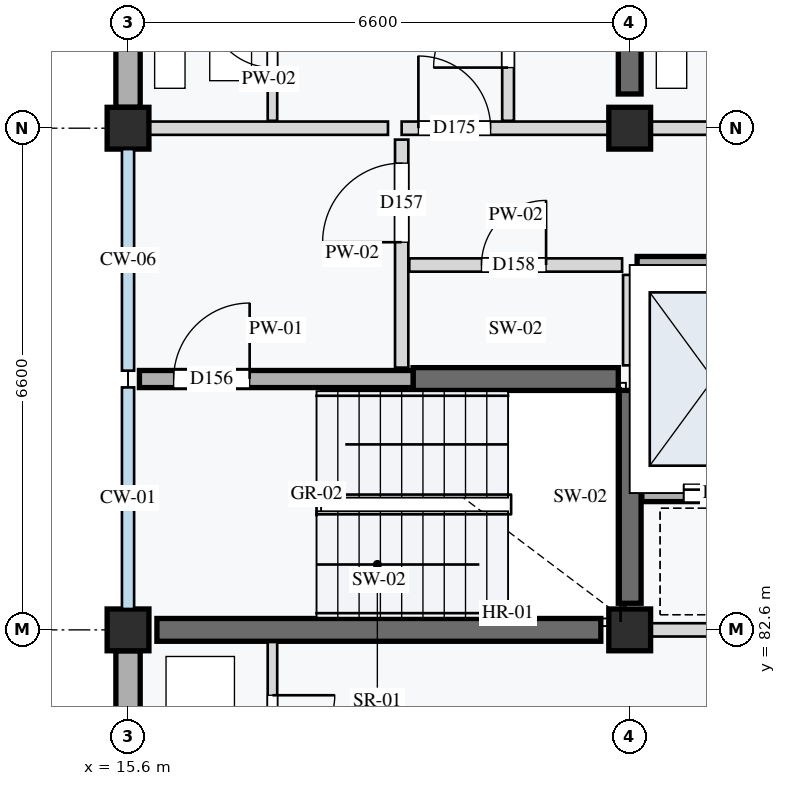
"""IFC4 building model, lengths in metres.
Left out: names, types, materials, properties, quantities, classifications, styles, units other than length and angle.
Written with IfcOpenShell. Run it as: python <this file> out.ifc"""

import sys

from ifc_helpers import new_model, si_unit, direction, frame, frame_2d, origin, origin_2d, place, context, subcontext, project, spatial, rectangle, extrude, element, fill, save


model = new_model("IFC4")
c1 = context("Model", 3, precision=1e-05, world=origin(), true_north=direction((0.0, 1.0)))
c2 = subcontext(c1, "Body", "Model", "MODEL_VIEW")
j1 = project(units=[si_unit("LENGTHUNIT", "METRE"), si_unit("PLANEANGLEUNIT", "RADIAN")], contexts=[c1])
p1 = place(None, origin())
s1 = spatial("IfcSite", under=j1, at=p1, CompositionType="ELEMENT")
p2 = place(p1, origin())
s2 = spatial("IfcBuilding", under=s1, at=p2, CompositionType="ELEMENT")
p3 = place(p2, frame((0.0, 0.0, 18.0)))
s3 = spatial("IfcBuildingStorey", under=s2, at=p3, CompositionType="ELEMENT", Elevation=18.0)
for number, where, z_axis, x_axis in (
    (1, (15.6, 82.6, 0.0), (0.0, 0.0, 1.0), (1.0, 0.0, 0.0)),
    (2, (15.6, 89.2, 0.0), (0.0, 0.0, 1.0), (1.0, 0.0, 0.0)),
    (3, (22.2, 82.6, 0.0), (0.0, 0.0, 1.0), (1.0, 0.0, 0.0)),
    (4, (22.2, 89.2, 0.0), (0.0, 0.0, 1.0), (1.0, 0.0, 0.0)),
):
    element("IfcColumn", number, at=place(p3, frame(where, z_axis=z_axis, x_axis=x_axis)), inside=s3, PredefinedType="COLUMN", context=c2, shape_type="SweptSolid", body=[
        extrude(rectangle(XDim=0.55, YDim=0.55, at=origin_2d()), origin(), (0.0, 0.0, 1.0), 3.2),
    ])
p4 = place(p3, frame((15.98, 82.6, 0.0), z_axis=(0.0, 0.0, 1.0), x_axis=(1.0, 0.0, 0.0)))
e5 = element("IfcWall", 5, at=p4, inside=s3, PredefinedType="SHEAR", context=c2, shape_type="SweptSolid", body=[
    extrude(rectangle(XDim=5.84, YDim=0.3, at=frame_2d((2.92, 0.0))), origin(), (0.0, 0.0, 1.0), 2.96),
])
p5 = place(p3, frame((19.35, 85.9, 0.0), z_axis=(0.0, 0.0, 1.0), x_axis=(1.0, 0.0, 0.0)))
e6 = element("IfcWall", 6, at=p5, inside=s3, PredefinedType="SHEAR", context=c2, shape_type="SweptSolid", body=[
    extrude(rectangle(XDim=2.7, YDim=0.3, at=frame_2d((1.35, 0.0))), origin(), (0.0, 0.0, 1.0), 2.96),
])
p6 = place(p3, frame((22.2, 82.95, 0.0), z_axis=(0.0, 0.0, 1.0), x_axis=(0.0, 1.0, 0.0)))
e7 = element("IfcWall", 7, at=p6, inside=s3, PredefinedType="SHEAR", context=c2, shape_type="SweptSolid", body=[
    extrude(rectangle(XDim=2.8, YDim=0.3, at=frame_2d((1.4, 0.0))), origin(), (0.0, 0.0, 1.0), 2.96),
])
p7 = place(p3, frame((22.2, 89.65, 0.0), z_axis=(0.0, 0.0, 1.0), x_axis=(0.0, 1.0, 0.0)))
e8 = element("IfcWall", 8, at=p7, inside=s3, PredefinedType="SHEAR", context=c2, shape_type="SweptSolid", body=[
    extrude(rectangle(XDim=5.7, YDim=0.3, at=frame_2d((2.85, 0.0))), origin(), (0.0, 0.0, 1.0), 2.96),
])
p8 = place(p3, frame((15.6, 76.275, 0.0), z_axis=(0.0, 0.0, 1.0), x_axis=(0.0, 1.0, 0.0)))
e9 = element("IfcWall", 9, at=p8, inside=s3, PredefinedType="STANDARD", context=c2, shape_type="SweptSolid", body=[
    extrude(rectangle(XDim=6.05, YDim=0.32, at=frame_2d((3.025, 0.0))), origin(), (0.0, 0.0, 1.0), 2.65),
])
p9 = place(p3, frame((15.6, 89.475, 0.0), z_axis=(0.0, 0.0, 1.0), x_axis=(0.0, 1.0, 0.0)))
e10 = element("IfcWall", 10, at=p9, inside=s3, PredefinedType="STANDARD", context=c2, shape_type="SweptSolid", body=[
    extrude(rectangle(XDim=6.05, YDim=0.32, at=frame_2d((3.025, 0.0))), origin(), (0.0, 0.0, 1.0), 2.65),
])
p10 = place(p3, frame((15.75, 85.9, 0.0), z_axis=(0.0, 0.0, 1.0), x_axis=(1.0, 0.0, 0.0)))
e11 = element("IfcWall", 11, at=p10, inside=s3, PredefinedType="STANDARD", context=c2, shape_type="SweptSolid", body=[
    extrude(rectangle(XDim=3.6, YDim=0.225, at=frame_2d((1.8, 0.0))), origin(), (0.0, 0.0, 1.0), 2.96),
])
p11 = place(p10, frame((0.45, 0.0, 0.0)))
e12 = element("IfcOpeningElement", 12, at=p11, cuts=e11, PredefinedType="OPENING", context=c2, shape_type="SweptSolid", body=[
    extrude(rectangle(XDim=1.0, YDim=2.16, at=frame_2d((0.5, 1.08))), frame((0.0, 0.123, 0.0), z_axis=(0.0, -1.0, 0.0), x_axis=(1.0, 0.0, 0.0)), (0.0, 0.0, 1.0), 0.245),
])
p12 = place(p3, frame((19.2, 86.05, 0.0), z_axis=(0.0, 0.0, 1.0), x_axis=(0.0, 1.0, 0.0)))
e13 = element("IfcWall", 13, at=p12, inside=s3, PredefinedType="PARTITIONING", context=c2, shape_type="SweptSolid", body=[
    extrude(rectangle(XDim=3.0, YDim=0.175, at=frame_2d((1.5, 0.0))), origin(), (0.0, 0.0, 1.0), 2.96),
])
p13 = place(p12, frame((1.65, 0.0, 0.0)))
e14 = element("IfcOpeningElement", 14, at=p13, cuts=e13, PredefinedType="OPENING", context=c2, shape_type="SweptSolid", body=[
    extrude(rectangle(XDim=1.04, YDim=2.12, at=frame_2d((0.52, 1.06))), frame((0.0, 0.097, 0.0), z_axis=(0.0, -1.0, 0.0), x_axis=(1.0, 0.0, 0.0)), (0.0, 0.0, 1.0), 0.195),
])
p14 = place(p3, frame((19.3, 87.4, 0.0), z_axis=(0.0, 0.0, 1.0), x_axis=(1.0, 0.0, 0.0)))
e15 = element("IfcWall", 15, at=p14, inside=s3, PredefinedType="PARTITIONING", context=c2, shape_type="SweptSolid", body=[
    extrude(rectangle(XDim=2.8, YDim=0.175, at=frame_2d((1.4, 0.0))), origin(), (0.0, 0.0, 1.0), 2.96),
])
p15 = place(p14, frame((0.95, 0.0, 0.0)))
e16 = element("IfcOpeningElement", 16, at=p15, cuts=e15, PredefinedType="OPENING", context=c2, shape_type="SweptSolid", body=[
    extrude(rectangle(XDim=0.85, YDim=2.0, at=frame_2d((0.425, 1.0))), frame((0.0, 0.097, 0.0), z_axis=(0.0, -1.0, 0.0), x_axis=(1.0, 0.0, 0.0)), (0.0, 0.0, 1.0), 0.195),
])
p16 = place(p3, frame((22.2, 86.08, 0.0), z_axis=(0.0, 0.0, 1.0), x_axis=(0.0, 1.0, 0.0)))
e17 = element("IfcWall", 17, at=p16, inside=s3, PredefinedType="PARTITIONING", context=c2, shape_type="SweptSolid", body=[
    extrude(rectangle(XDim=1.19, YDim=0.175, at=frame_2d((0.595, 0.0))), origin(), (0.0, 0.0, 1.0), 2.96),
])
p17 = place(p3, frame((22.36, 84.4, 0.0), z_axis=(0.0, 0.0, 1.0), x_axis=(1.0, 0.0, 0.0)))
e18 = element("IfcWall", 18, at=p17, inside=s3, PredefinedType="STANDARD", context=c2, shape_type="SweptSolid", body=[
    extrude(rectangle(XDim=2.04, YDim=0.225, at=frame_2d((1.02, 0.0))), origin(), (0.0, 0.0, 1.0), 2.96),
])
p18 = place(p17, frame((0.55, 0.0, 0.0)))
e19 = element("IfcOpeningElement", 19, at=p18, cuts=e18, PredefinedType="OPENING", context=c2, shape_type="SweptSolid", body=[
    extrude(rectangle(XDim=1.1, YDim=2.1, at=frame_2d((0.55, 1.05))), frame((0.0, 0.123, 0.0), z_axis=(0.0, -1.0, 0.0), x_axis=(1.0, 0.0, 0.0)), (0.0, 0.0, 1.0), 0.245),
])
p19 = place(p3, frame((22.298, 87.4, 0.0), z_axis=(0.0, 0.0, 1.0), x_axis=(1.0, 0.0, 0.0)))
e20 = element("IfcWall", 20, at=p19, inside=s3, PredefinedType="STANDARD", context=c2, shape_type="SweptSolid", body=[
    extrude(rectangle(XDim=4.022, YDim=0.225, at=frame_2d((2.011, 0.0))), origin(), (0.0, 0.0, 1.0), 2.96),
])
p20 = place(p3, frame((22.2, 82.6, 0.0), z_axis=(0.0, 0.0, 1.0), x_axis=(1.0, 0.0, 0.0)))
e21 = element("IfcWall", 21, at=p20, inside=s3, PredefinedType="PARTITIONING", context=c2, shape_type="SweptSolid", body=[
    extrude(rectangle(XDim=6.6, YDim=0.175, at=frame_2d((3.3, 0.0))), origin(), (0.0, 0.0, 1.0), 2.55),
])
p21 = place(p20, frame((1.7, 0.0, 0.0)))
e22 = element("IfcOpeningElement", 22, at=p21, cuts=e21, PredefinedType="OPENING", context=c2, shape_type="SweptSolid", body=[
    extrude(rectangle(XDim=0.92, YDim=2.14, at=frame_2d((0.46, 1.07))), frame((0.0, 0.097, 0.0), z_axis=(0.0, -1.0, 0.0), x_axis=(1.0, 0.0, 0.0)), (0.0, 0.0, 1.0), 0.195),
])
p22 = place(p3, frame((17.5, 82.44, 0.0), z_axis=(0.0, 0.0, 1.0), x_axis=(0.0, -1.0, 0.0)))
e23 = element("IfcWall", 23, at=p22, inside=s3, PredefinedType="PARTITIONING", context=c2, shape_type="SweptSolid", body=[
    extrude(rectangle(XDim=2.24, YDim=0.125, at=frame_2d((1.12, 0.0))), origin(), (0.0, 0.0, 1.0), 2.96),
])
p23 = place(p22, frame((0.7, 0.0, 0.0)))
e24 = element("IfcOpeningElement", 24, at=p23, cuts=e23, PredefinedType="OPENING", context=c2, shape_type="SweptSolid", body=[
    extrude(rectangle(XDim=0.82, YDim=2.05, at=frame_2d((0.41, 1.025))), frame((0.0, 0.073, 0.0), z_axis=(0.0, -1.0, 0.0), x_axis=(1.0, 0.0, 0.0)), (0.0, 0.0, 1.0), 0.145),
])
p24 = place(p3, frame((15.88, 89.2, 0.0), z_axis=(0.0, 0.0, 1.0), x_axis=(1.0, 0.0, 0.0)))
e25 = element("IfcWall", 25, at=p24, inside=s3, PredefinedType="PARTITIONING", context=c2, shape_type="SweptSolid", body=[
    extrude(rectangle(XDim=3.14, YDim=0.175, at=frame_2d((1.57, 0.0))), origin(), (0.0, 0.0, 1.0), 2.55),
])
p25 = place(p3, frame((19.2, 89.2, 0.0), z_axis=(0.0, 0.0, 1.0), x_axis=(1.0, 0.0, 0.0)))
e26 = element("IfcWall", 26, at=p25, inside=s3, PredefinedType="PARTITIONING", context=c2, shape_type="SweptSolid", body=[
    extrude(rectangle(XDim=3.0, YDim=0.175, at=frame_2d((1.5, 0.0))), origin(), (0.0, 0.0, 1.0), 2.55),
])
p26 = place(p25, frame((0.22, 0.0, 0.0)))
e27 = element("IfcOpeningElement", 27, at=p26, cuts=e26, PredefinedType="OPENING", context=c2, shape_type="SweptSolid", body=[
    extrude(rectangle(XDim=0.95, YDim=2.16, at=frame_2d((0.475, 1.08))), frame((0.0, 0.097, 0.0), z_axis=(0.0, -1.0, 0.0), x_axis=(1.0, 0.0, 0.0)), (0.0, 0.0, 1.0), 0.195),
])
p27 = place(p3, frame((17.5, 89.298, 0.0), z_axis=(0.0, 0.0, 1.0), x_axis=(0.0, 1.0, 0.0)))
e28 = element("IfcWall", 28, at=p27, inside=s3, PredefinedType="PARTITIONING", context=c2, shape_type="SweptSolid", body=[
    extrude(rectangle(XDim=2.302, YDim=0.125, at=frame_2d((1.151, 0.0))), origin(), (0.0, 0.0, 1.0), 2.96),
])
p28 = place(p27, frame((0.7, 0.0, 0.0)))
e29 = element("IfcOpeningElement", 29, at=p28, cuts=e28, PredefinedType="OPENING", context=c2, shape_type="SweptSolid", body=[
    extrude(rectangle(XDim=0.84, YDim=2.06, at=frame_2d((0.42, 1.03))), frame((0.0, 0.073, 0.0), z_axis=(0.0, -1.0, 0.0), x_axis=(1.0, 0.0, 0.0)), (0.0, 0.0, 1.0), 0.145),
])
p29 = place(p3, frame((20.6, 89.298, 0.0), z_axis=(0.0, 0.0, 1.0), x_axis=(0.0, 1.0, 0.0)))
e30 = element("IfcWall", 30, at=p29, inside=s3, PredefinedType="PARTITIONING", context=c2, shape_type="SweptSolid", body=[
    extrude(rectangle(XDim=2.302, YDim=0.155, at=frame_2d((1.151, 0.0))), origin(), (0.0, 0.0, 1.0), 2.96),
])
p30 = place(p29, frame((0.7, 0.0, 0.0)))
e31 = element("IfcOpeningElement", 31, at=p30, cuts=e30, PredefinedType="OPENING", context=c2, shape_type="SweptSolid", body=[
    extrude(rectangle(XDim=0.98, YDim=2.12, at=frame_2d((0.49, 1.06))), frame((0.0, 0.087, 0.0), z_axis=(0.0, -1.0, 0.0), x_axis=(1.0, 0.0, 0.0)), (0.0, 0.0, 1.0), 0.175),
])
p31 = place(p3, frame((22.2, 89.2, 0.0), z_axis=(0.0, 0.0, 1.0), x_axis=(1.0, 0.0, 0.0)))
e32 = element("IfcWall", 32, at=p31, inside=s3, PredefinedType="PARTITIONING", context=c2, shape_type="SweptSolid", body=[
    extrude(rectangle(XDim=6.6, YDim=0.175, at=frame_2d((3.3, 0.0))), origin(), (0.0, 0.0, 1.0), 2.55),
])
p32 = place(p31, frame((3.85, 0.0, 0.0)))
e33 = element("IfcOpeningElement", 33, at=p32, cuts=e32, PredefinedType="OPENING", context=c2, shape_type="SweptSolid", body=[
    extrude(rectangle(XDim=0.95, YDim=2.16, at=frame_2d((0.475, 1.08))), frame((0.0, 0.097, 0.0), z_axis=(0.0, -1.0, 0.0), x_axis=(1.0, 0.0, 0.0)), (0.0, 0.0, 1.0), 0.195),
])
p33 = place(p11, origin())
e34 = element("IfcDoor", 34, at=p33, inside=s3, OperationType="SINGLE_SWING_RIGHT", PredefinedType="DOOR", context=c2, shape_type="SweptSolid", body=[
    extrude(rectangle(XDim=1.0, YDim=2.16, at=frame_2d((0.5, 1.08))), frame((0.0, 0.025, 0.0), z_axis=(0.0, -1.0, 0.0), x_axis=(1.0, 0.0, 0.0)), (0.0, 0.0, 1.0), 0.05),
])
fill(e12, e34)
p34 = place(p13, origin())
e35 = element("IfcDoor", 35, at=p34, inside=s3, OperationType="SINGLE_SWING_LEFT", PredefinedType="DOOR", context=c2, shape_type="SweptSolid", body=[
    extrude(rectangle(XDim=1.04, YDim=2.12, at=frame_2d((0.52, 1.06))), frame((0.0, 0.025, 0.0), z_axis=(0.0, -1.0, 0.0), x_axis=(1.0, 0.0, 0.0)), (0.0, 0.0, 1.0), 0.05),
])
fill(e14, e35)
p35 = place(p15, origin())
e36 = element("IfcDoor", 36, at=p35, inside=s3, OperationType="SINGLE_SWING_RIGHT", PredefinedType="DOOR", context=c2, shape_type="SweptSolid", body=[
    extrude(rectangle(XDim=0.85, YDim=2.0, at=frame_2d((0.425, 1.0))), frame((0.0, 0.025, 0.0), z_axis=(0.0, -1.0, 0.0), x_axis=(1.0, 0.0, 0.0)), (0.0, 0.0, 1.0), 0.05),
])
fill(e16, e36)
p36 = place(p18, origin())
e37 = element("IfcDoor", 37, at=p36, inside=s3, OperationType="DOUBLE_DOOR_SLIDING", PredefinedType="DOOR", context=c2, shape_type="SweptSolid", body=[
    extrude(rectangle(XDim=1.1, YDim=2.1, at=frame_2d((0.55, 1.05))), frame((0.0, 0.025, 0.0), z_axis=(0.0, -1.0, 0.0), x_axis=(1.0, 0.0, 0.0)), (0.0, 0.0, 1.0), 0.05),
])
fill(e19, e37)
p37 = place(p23, origin())
e38 = element("IfcDoor", 38, at=p37, inside=s3, OperationType="SINGLE_SWING_LEFT", PredefinedType="DOOR", context=c2, shape_type="SweptSolid", body=[
    extrude(rectangle(XDim=0.82, YDim=2.05, at=frame_2d((0.41, 1.025))), frame((0.0, 0.025, 0.0), z_axis=(0.0, -1.0, 0.0), x_axis=(1.0, 0.0, 0.0)), (0.0, 0.0, 1.0), 0.05),
])
fill(e24, e38)
p38 = place(p26, origin())
e39 = element("IfcDoor", 39, at=p38, inside=s3, OperationType="SINGLE_SWING_LEFT", PredefinedType="DOOR", context=c2, shape_type="SweptSolid", body=[
    extrude(rectangle(XDim=0.95, YDim=2.16, at=frame_2d((0.475, 1.08))), frame((0.0, 0.025, 0.0), z_axis=(0.0, -1.0, 0.0), x_axis=(1.0, 0.0, 0.0)), (0.0, 0.0, 1.0), 0.05),
])
fill(e27, e39)
p39 = place(p28, origin())
e40 = element("IfcDoor", 40, at=p39, inside=s3, OperationType="SINGLE_SWING_RIGHT", PredefinedType="DOOR", context=c2, shape_type="SweptSolid", body=[
    extrude(rectangle(XDim=0.84, YDim=2.06, at=frame_2d((0.42, 1.03))), frame((0.0, 0.025, 0.0), z_axis=(0.0, -1.0, 0.0), x_axis=(1.0, 0.0, 0.0)), (0.0, 0.0, 1.0), 0.05),
])
fill(e29, e40)
p40 = place(p30, origin())
e41 = element("IfcDoor", 41, at=p40, inside=s3, OperationType="SINGLE_SWING_LEFT", PredefinedType="DOOR", context=c2, shape_type="SweptSolid", body=[
    extrude(rectangle(XDim=0.98, YDim=2.12, at=frame_2d((0.49, 1.06))), frame((0.0, 0.025, 0.0), z_axis=(0.0, -1.0, 0.0), x_axis=(1.0, 0.0, 0.0)), (0.0, 0.0, 1.0), 0.05),
])
fill(e31, e41)
save(model, sys.argv[1])
